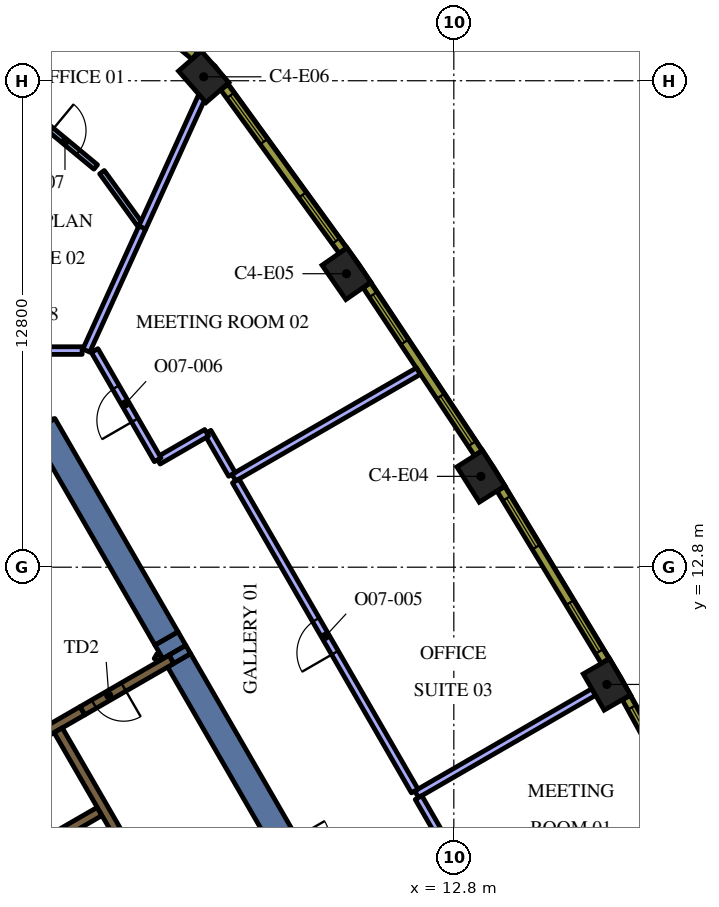
"""IFC4 building model, lengths in metres.
Left out: names, types, materials, properties, quantities, classifications, styles, units other than length and angle.
Written with IfcOpenShell. Run it as: python <this file> out.ifc"""

import sys

from ifc_helpers import new_model, si_unit, direction, frame, frame_2d, origin, origin_2d, place, context, subcontext, project, spatial, polyline, rectangle, outline, extrude, element, fill, save


model = new_model("IFC4")
c1 = context("Model", 3, precision=1e-05, world=origin(), true_north=direction((0.0, 1.0)))
c2 = subcontext(c1, "Body", "Model", "MODEL_VIEW")
j1 = project(units=[si_unit("LENGTHUNIT", "METRE"), si_unit("PLANEANGLEUNIT", "RADIAN")], contexts=[c1])
p1 = place(None, origin())
s1 = spatial("IfcSite", under=j1, at=p1, CompositionType="ELEMENT")
p2 = place(p1, origin())
s2 = spatial("IfcBuilding", under=s1, at=p2, CompositionType="ELEMENT")
p3 = place(p2, frame((0.0, 0.0, 218.4)))
s3 = spatial("IfcBuildingStorey", under=s2, at=p3, CompositionType="ELEMENT", Elevation=218.4)
for number, where, z_axis, x_axis in (
    (1, (16.827, 9.715, 0.0), (0.0, 0.0, 1.0), (-0.5, 0.866, 0.0)),
    (2, (13.513, 15.19, 0.0), (0.0, 0.0, 1.0), (-0.536, 0.845, 0.0)),
    (3, (9.975, 20.522, 0.0), (0.0, 0.0, 1.0), (-0.57, 0.822, 0.0)),
    (4, (6.219, 25.703, 0.0), (0.0, 0.0, 1.0), (-0.657, 0.754, 0.0)),
):
    element("IfcColumn", number, at=place(p3, frame(where, z_axis=z_axis, x_axis=x_axis)), inside=s3, PredefinedType="COLUMN", context=c2, shape_type="SweptSolid", body=[
        extrude(rectangle(XDim=1.1, YDim=0.8, at=origin_2d()), origin(), (0.0, 0.0, 1.0), 4.2),
    ])
p4 = place(p3, frame((5.445, 10.569, 0.0), z_axis=(0.0, 0.0, 1.0), x_axis=(-0.500218351069, 0.865899302029, 0.0)))
e5 = element("IfcWall", 5, at=p4, inside=s3, PredefinedType="SOLIDWALL", context=c2, shape_type="SweptSolid", body=[
    extrude(rectangle(XDim=0.412, YDim=0.7, at=frame_2d((0.206, 0.0))), origin(), (0.0, 0.0, 1.0), 4.2),
])
p5 = place(p3, frame((5.571, 10.35, 0.0), z_axis=(0.0, 0.0, 1.0), x_axis=(0.499968379186, -0.8660436593, 0.0)))
e6 = element("IfcWall", 6, at=p5, inside=s3, PredefinedType="SOLIDWALL", context=c2, shape_type="SweptSolid", body=[
    extrude(rectangle(XDim=5.328, YDim=0.7, at=frame_2d((2.664, 0.0))), origin(), (0.0, 0.0, 1.0), 4.2),
])
p6 = place(p3, origin())
e7 = element("IfcWall", 7, at=p6, inside=s3, PredefinedType="SOLIDWALL", context=c2, shape_type="SweptSolid", body=[
    extrude(outline(polyline([(5.432, 10.272), (5.308, 10.487), (5.749, 10.742), (5.873, 10.527), (5.432, 10.272)])), origin(), (0.0, 0.0, 1.0), 4.2),
])
p7 = place(p3, frame((5.238, 10.927, 0.0), z_axis=(0.0, 0.0, 1.0), x_axis=(-0.499985607887, 0.866033712915, 0.0)))
e8 = element("IfcWall", 8, at=p7, inside=s3, PredefinedType="SOLIDWALL", context=c2, shape_type="SweptSolid", body=[
    extrude(rectangle(XDim=6.478, YDim=0.7, at=frame_2d((3.239, 0.0))), origin(), (0.0, 0.0, 1.0), 4.2),
])
e9 = element("IfcWall", 9, at=p6, inside=s3, PredefinedType="SOLIDWALL", context=c2, shape_type="SweptSolid", body=[
    extrude(outline(polyline([(1.501, 16.7), (2.277, 16.7), (1.695, 16.364), (1.501, 16.7)])), origin(), (0.0, 0.0, 1.0), 4.2),
])
p8 = place(p3, frame((3.028, 9.023, 0.0), z_axis=(0.0, 0.0, 1.0), x_axis=(-0.866036587186, -0.49998062928, 0.0)))
e10 = element("IfcWall", 10, at=p8, inside=s3, PredefinedType="SOLIDWALL", context=c2, shape_type="SweptSolid", body=[
    extrude(rectangle(XDim=3.384, YDim=0.25, at=frame_2d((1.692, 0.0))), origin(), (0.0, 0.0, 1.0), 4.2),
])
p9 = place(p3, frame((5.97, -2.591, 0.0), z_axis=(0.0, 0.0, 1.0), x_axis=(-0.499994469932, 0.866028596547, 0.0)))
e11 = element("IfcWall", 11, at=p9, inside=s3, PredefinedType="SOLIDWALL", context=c2, shape_type="SweptSolid", body=[
    extrude(rectangle(XDim=10.488, YDim=0.25, at=frame_2d((5.244, 0.0))), origin(), (0.0, 0.0, 1.0), 4.2),
])
p10 = place(p3, frame((1.574, 5.274, 0.0), z_axis=(0.0, 0.0, 1.0), x_axis=(0.866028486751, 0.499994660107, 0.0)))
e12 = element("IfcWall", 12, at=p10, inside=s3, PredefinedType="SOLIDWALL", context=c2, shape_type="SweptSolid", body=[
    extrude(rectangle(XDim=2.2, YDim=0.25, at=frame_2d((1.1, 0.0))), origin(), (0.0, 0.0, 1.0), 4.2),
])
p11 = place(p3, frame((4.98, 10.358, 0.0), z_axis=(0.0, 0.0, 1.0), x_axis=(0.500640202437, 0.86565546709, 0.0)))
e13 = element("IfcWall", 13, at=p11, inside=s3, PredefinedType="PARTITIONING", context=c2, shape_type="SweptSolid", body=[
    extrude(rectangle(XDim=0.146, YDim=0.15, at=frame_2d((0.073, 0.0))), origin(), (0.0, 0.0, 1.0), 3.45),
])
p12 = place(p3, frame((8.565, -2.185, 0.0), z_axis=(0.0, 0.0, 1.0), x_axis=(-0.499997954832, 0.866026584559, 0.0)))
e14 = element("IfcWall", 14, at=p12, inside=s3, PredefinedType="SOLIDWALL", context=c2, shape_type="SweptSolid", body=[
    extrude(rectangle(XDim=12.35, YDim=0.25, at=frame_2d((6.175, 0.0))), origin(), (0.0, 0.0, 1.0), 4.2),
])
p13 = place(p12, frame((0.585, 0.0, 0.0)))
e15 = element("IfcOpeningElement", 15, at=p13, cuts=e14, PredefinedType="OPENING", context=c2, shape_type="SweptSolid", body=[
    extrude(rectangle(XDim=1.1, YDim=2.1, at=frame_2d((0.55, 1.05))), frame((0.0, 0.135, 0.0), z_axis=(0.0, -1.0, 0.0), x_axis=(1.0, 0.0, 0.0)), (0.0, 0.0, 1.0), 0.27),
])
p14 = place(p3, frame((5.366, 10.373, 0.0), z_axis=(0.0, 0.0, 1.0), x_axis=(-0.866019956843, -0.50000943426, 0.0)))
e16 = element("IfcWall", 16, at=p14, inside=s3, PredefinedType="SOLIDWALL", context=c2, shape_type="SweptSolid", body=[
    extrude(rectangle(XDim=2.7, YDim=0.25, at=frame_2d((1.35, 0.0))), origin(), (0.0, 0.0, 1.0), 4.2),
])
p15 = place(p14, frame((1.45, 0.0, 0.0)))
e17 = element("IfcOpeningElement", 17, at=p15, cuts=e16, PredefinedType="OPENING", context=c2, shape_type="SweptSolid", body=[
    extrude(rectangle(XDim=0.9, YDim=2.1, at=frame_2d((0.45, 1.05))), frame((0.0, 0.135, 0.0), z_axis=(0.0, -1.0, 0.0), x_axis=(1.0, 0.0, 0.0)), (0.0, 0.0, 1.0), 0.27),
])
p16 = place(p3, frame((11.821, 6.825, 0.0), z_axis=(0.0, 0.0, 1.0), x_axis=(0.866011792348, 0.500023574959, 0.0)))
e18 = element("IfcWall", 18, at=p16, inside=s3, PredefinedType="PARTITIONING", context=c2, shape_type="SweptSolid", body=[
    extrude(rectangle(XDim=5.381, YDim=0.2, at=frame_2d((2.69, 0.0))), origin(), (0.0, 0.0, 1.0), 3.45),
])
p17 = place(p3, frame((16.581, -1.419, 0.0), z_axis=(0.0, 0.0, 1.0), x_axis=(-0.500019350398, 0.866014231539, 0.0)))
e19 = element("IfcWall", 19, at=p17, inside=s3, PredefinedType="PARTITIONING", context=c2, shape_type="SweptSolid", body=[
    extrude(rectangle(XDim=9.42, YDim=0.2, at=frame_2d((4.71, 0.0))), origin(), (0.0, 0.0, 1.0), 3.45),
])
p18 = place(p17, frame((4.2, 0.0, 0.0)))
e20 = element("IfcOpeningElement", 20, at=p18, cuts=e19, PredefinedType="OPENING", context=c2, shape_type="SweptSolid", body=[
    extrude(rectangle(XDim=1.0, YDim=2.1, at=frame_2d((0.5, 1.05))), frame((0.0, 0.11, 0.0), z_axis=(0.0, -1.0, 0.0), x_axis=(1.0, 0.0, 0.0)), (0.0, 0.0, 1.0), 0.22),
])
p19 = place(p3, frame((7.011, 15.156, 0.0), z_axis=(0.0, 0.0, 1.0), x_axis=(0.866015917575, 0.500016430238, 0.0)))
e21 = element("IfcWall", 21, at=p19, inside=s3, PredefinedType="PARTITIONING", context=c2, shape_type="SweptSolid", body=[
    extrude(rectangle(XDim=5.607, YDim=0.2, at=frame_2d((2.804, 0.0))), origin(), (0.0, 0.0, 1.0), 3.45),
])
p20 = place(p3, frame((11.771, 6.912, 0.0), z_axis=(0.0, 0.0, 1.0), x_axis=(-0.500008127286, 0.866020711443, 0.0)))
e22 = element("IfcWall", 22, at=p20, inside=s3, PredefinedType="PARTITIONING", context=c2, shape_type="SweptSolid", body=[
    extrude(rectangle(XDim=9.42, YDim=0.2, at=frame_2d((4.71, 0.0))), origin(), (0.0, 0.0, 1.0), 3.45),
])
p21 = place(p20, frame((4.2, 0.0, 0.0)))
e23 = element("IfcOpeningElement", 23, at=p21, cuts=e22, PredefinedType="OPENING", context=c2, shape_type="SweptSolid", body=[
    extrude(rectangle(XDim=1.0, YDim=2.1, at=frame_2d((0.5, 1.05))), frame((0.0, 0.11, 0.0), z_axis=(0.0, -1.0, 0.0), x_axis=(1.0, 0.0, 0.0)), (0.0, 0.0, 1.0), 0.22),
])
p22 = place(p3, frame((4.599, 21.729, 0.0), z_axis=(0.0, 0.0, 1.0), x_axis=(0.414300595715, 0.91014010811, 0.0)))
e24 = element("IfcWall", 24, at=p22, inside=s3, PredefinedType="PARTITIONING", context=c2, shape_type="SweptSolid", body=[
    extrude(rectangle(XDim=3.77, YDim=0.2, at=frame_2d((1.885, 0.0))), origin(), (0.0, 0.0, 1.0), 3.45),
])
p23 = place(p3, frame((3.129, 18.5, 0.0), z_axis=(0.0, 0.0, 1.0), x_axis=(0.41435618773, 0.910114800281, 0.0)))
e25 = element("IfcWall", 25, at=p23, inside=s3, PredefinedType="PARTITIONING", context=c2, shape_type="SweptSolid", body=[
    extrude(rectangle(XDim=3.557, YDim=0.2, at=frame_2d((1.779, 0.0))), origin(), (0.0, 0.0, 1.0), 3.45),
])
p24 = place(p3, frame((6.961, 15.243, 0.0), z_axis=(0.0, 0.0, 1.0), x_axis=(-0.500036104519, 0.866004557827, 0.0)))
e26 = element("IfcWall", 26, at=p24, inside=s3, PredefinedType="PARTITIONING", context=c2, shape_type="SweptSolid", body=[
    extrude(rectangle(XDim=1.28, YDim=0.2, at=frame_2d((0.64, 0.0))), origin(), (0.0, 0.0, 1.0), 3.45),
])
p25 = place(p3, frame((6.295, 16.336, 0.0), z_axis=(0.0, 0.0, 1.0), x_axis=(-0.866088799389, -0.499890179513, 0.0)))
e27 = element("IfcWall", 27, at=p25, inside=s3, PredefinedType="PARTITIONING", context=c2, shape_type="SweptSolid", body=[
    extrude(rectangle(XDim=1.47, YDim=0.2, at=frame_2d((0.735, 0.0))), origin(), (0.0, 0.0, 1.0), 3.45),
])
p26 = place(p3, frame((5.007, 15.627, 0.0), z_axis=(0.0, 0.0, 1.0), x_axis=(-0.499962429619, 0.866047093968, 0.0)))
e28 = element("IfcWall", 28, at=p26, inside=s3, PredefinedType="PARTITIONING", context=c2, shape_type="SweptSolid", body=[
    extrude(rectangle(XDim=3.317, YDim=0.2, at=frame_2d((1.659, 0.0))), origin(), (0.0, 0.0, 1.0), 3.45),
])
p27 = place(p26, frame((1.2, 0.0, 0.0)))
e29 = element("IfcOpeningElement", 29, at=p27, cuts=e28, PredefinedType="OPENING", context=c2, shape_type="SweptSolid", body=[
    extrude(rectangle(XDim=1.0, YDim=2.1, at=frame_2d((0.5, 1.05))), frame((0.0, 0.11, 0.0), z_axis=(0.0, -1.0, 0.0), x_axis=(1.0, 0.0, 0.0)), (0.0, 0.0, 1.0), 0.22),
])
p28 = place(p3, frame((4.533, 21.826, 0.0), z_axis=(0.0, 0.0, 1.0), x_axis=(-0.587019669034, 0.809572670096, 0.0)))
e30 = element("IfcWall", 30, at=p28, inside=s3, PredefinedType="PARTITIONING", context=c2, shape_type="SweptSolid", body=[
    extrude(rectangle(XDim=1.689, YDim=0.15, at=frame_2d((0.845, 0.0))), origin(), (0.0, 0.0, 1.0), 3.45),
])
p29 = place(p3, frame((1.808, 24.631, 0.0), z_axis=(0.0, 0.0, 1.0), x_axis=(0.769986239032, -0.638060492195, 0.0)))
e31 = element("IfcWall", 31, at=p29, inside=s3, PredefinedType="PARTITIONING", context=c2, shape_type="SweptSolid", body=[
    extrude(rectangle(XDim=2.038, YDim=0.15, at=frame_2d((1.019, 0.0))), origin(), (0.0, 0.0, 1.0), 3.45),
])
p30 = place(p29, frame((0.538, 0.0, 0.0)))
e32 = element("IfcOpeningElement", 32, at=p30, cuts=e31, PredefinedType="OPENING", context=c2, shape_type="SweptSolid", body=[
    extrude(rectangle(XDim=0.9, YDim=2.1, at=frame_2d((0.45, 1.05))), frame((0.0, 0.085, 0.0), z_axis=(0.0, -1.0, 0.0), x_axis=(1.0, 0.0, 0.0)), (0.0, 0.0, 1.0), 0.17),
])
p31 = place(p3, frame((3.019, 18.5, 0.0), z_axis=(0.0, 0.0, 1.0), x_axis=(-1.0, 0.0, 0.0)))
e33 = element("IfcWall", 33, at=p31, inside=s3, PredefinedType="PARTITIONING", context=c2, shape_type="SweptSolid", body=[
    extrude(rectangle(XDim=2.919, YDim=0.2, at=frame_2d((1.459, 0.0))), origin(), (0.0, 0.0, 1.0), 3.45),
])
p32 = place(p31, frame((1.0, 0.0, 0.0)))
e34 = element("IfcOpeningElement", 34, at=p32, cuts=e33, PredefinedType="OPENING", context=c2, shape_type="SweptSolid", body=[
    extrude(rectangle(XDim=1.0, YDim=2.1, at=frame_2d((0.5, 1.05))), frame((0.0, 0.11, 0.0), z_axis=(0.0, -1.0, 0.0), x_axis=(1.0, 0.0, 0.0)), (0.0, 0.0, 1.0), 0.22),
])
p33 = place(p3, frame((19.892, 4.725, 0.0), z_axis=(0.0, 0.0, 1.0), x_axis=(-0.481925825015, 0.876212017256, 0.0)))
e35 = element("IfcWall", 35, at=p33, inside=s3, PredefinedType="SOLIDWALL", context=c2, shape_type="SweptSolid", body=[
    extrude(rectangle(XDim=5.299, YDim=0.24, at=frame_2d((2.649, 0.0))), origin(), (0.0, 0.0, 1.0), 3.95),
])
p34 = place(p33, frame((0.295, 0.0, 0.9)))
e36 = element("IfcOpeningElement", 36, at=p34, cuts=e35, PredefinedType="OPENING", context=c2, shape_type="SweptSolid", body=[
    extrude(rectangle(XDim=1.5, YDim=2.55, at=frame_2d((0.75, 1.275))), frame((0.0, 0.13, 0.0), z_axis=(0.0, -1.0, 0.0), x_axis=(1.0, 0.0, 0.0)), (0.0, 0.0, 1.0), 0.26),
])
p35 = place(p33, frame((3.504, 0.0, 0.9)))
e37 = element("IfcOpeningElement", 37, at=p35, cuts=e35, PredefinedType="OPENING", context=c2, shape_type="SweptSolid", body=[
    extrude(rectangle(XDim=1.5, YDim=2.55, at=frame_2d((0.75, 1.275))), frame((0.0, 0.13, 0.0), z_axis=(0.0, -1.0, 0.0), x_axis=(1.0, 0.0, 0.0)), (0.0, 0.0, 1.0), 0.26),
])
p36 = place(p3, frame((16.782, 10.331, 0.0), z_axis=(0.0, 0.0, 1.0), x_axis=(-0.517846166225, 0.855473756538, 0.0)))
e38 = element("IfcWall", 38, at=p36, inside=s3, PredefinedType="SOLIDWALL", context=c2, shape_type="SweptSolid", body=[
    extrude(rectangle(XDim=5.298, YDim=0.24, at=frame_2d((2.649, 0.0))), origin(), (0.0, 0.0, 1.0), 3.95),
])
p37 = place(p36, frame((0.294, 0.0, 0.9)))
e39 = element("IfcOpeningElement", 39, at=p37, cuts=e38, PredefinedType="OPENING", context=c2, shape_type="SweptSolid", body=[
    extrude(rectangle(XDim=1.5, YDim=2.55, at=frame_2d((0.75, 1.275))), frame((0.0, 0.13, 0.0), z_axis=(0.0, -1.0, 0.0), x_axis=(1.0, 0.0, 0.0)), (0.0, 0.0, 1.0), 0.26),
])
p38 = place(p36, frame((3.504, 0.0, 0.9)))
e40 = element("IfcOpeningElement", 40, at=p38, cuts=e38, PredefinedType="OPENING", context=c2, shape_type="SweptSolid", body=[
    extrude(rectangle(XDim=1.5, YDim=2.55, at=frame_2d((0.75, 1.275))), frame((0.0, 0.13, 0.0), z_axis=(0.0, -1.0, 0.0), x_axis=(1.0, 0.0, 0.0)), (0.0, 0.0, 1.0), 0.26),
])
p39 = place(p3, frame((13.442, 15.803, 0.0), z_axis=(0.0, 0.0, 1.0), x_axis=(-0.552901821755, 0.833246407433, 0.0)))
e41 = element("IfcWall", 41, at=p39, inside=s3, PredefinedType="SOLIDWALL", context=c2, shape_type="SweptSolid", body=[
    extrude(rectangle(XDim=5.298, YDim=0.24, at=frame_2d((2.649, 0.0))), origin(), (0.0, 0.0, 1.0), 3.95),
])
p40 = place(p39, frame((0.295, 0.0, 0.9)))
e42 = element("IfcOpeningElement", 42, at=p40, cuts=e41, PredefinedType="OPENING", context=c2, shape_type="SweptSolid", body=[
    extrude(rectangle(XDim=1.5, YDim=2.55, at=frame_2d((0.75, 1.275))), frame((0.0, 0.13, 0.0), z_axis=(0.0, -1.0, 0.0), x_axis=(1.0, 0.0, 0.0)), (0.0, 0.0, 1.0), 0.26),
])
p41 = place(p39, frame((3.504, 0.0, 0.9)))
e43 = element("IfcOpeningElement", 43, at=p41, cuts=e41, PredefinedType="OPENING", context=c2, shape_type="SweptSolid", body=[
    extrude(rectangle(XDim=1.5, YDim=2.55, at=frame_2d((0.75, 1.275))), frame((0.0, 0.13, 0.0), z_axis=(0.0, -1.0, 0.0), x_axis=(1.0, 0.0, 0.0)), (0.0, 0.0, 1.0), 0.26),
])
p42 = place(p3, frame((9.878, 21.132, 0.0), z_axis=(0.0, 0.0, 1.0), x_axis=(-0.586998456641, 0.80958805074, 0.0)))
e44 = element("IfcWall", 44, at=p42, inside=s3, PredefinedType="SOLIDWALL", context=c2, shape_type="SweptSolid", body=[
    extrude(rectangle(XDim=5.311, YDim=0.24, at=frame_2d((2.655, 0.0))), origin(), (0.0, 0.0, 1.0), 3.95),
])
p43 = place(p42, frame((0.306, 0.0, 0.9)))
e45 = element("IfcOpeningElement", 45, at=p43, cuts=e44, PredefinedType="OPENING", context=c2, shape_type="SweptSolid", body=[
    extrude(rectangle(XDim=1.5, YDim=2.55, at=frame_2d((0.75, 1.275))), frame((0.0, 0.13, 0.0), z_axis=(0.0, -1.0, 0.0), x_axis=(1.0, 0.0, 0.0)), (0.0, 0.0, 1.0), 0.26),
])
p44 = place(p42, frame((3.539, 0.0, 0.9)))
e46 = element("IfcOpeningElement", 46, at=p44, cuts=e44, PredefinedType="OPENING", context=c2, shape_type="SweptSolid", body=[
    extrude(rectangle(XDim=1.5, YDim=2.55, at=frame_2d((0.75, 1.275))), frame((0.0, 0.13, 0.0), z_axis=(0.0, -1.0, 0.0), x_axis=(1.0, 0.0, 0.0)), (0.0, 0.0, 1.0), 0.26),
])
p45 = place(p3, frame((5.987, 26.259, 0.0), z_axis=(0.0, 0.0, 1.0), x_axis=(-0.769990037733, 0.638055908045, 0.0)))
e47 = element("IfcWall", 47, at=p45, inside=s3, PredefinedType="SOLIDWALL", context=c2, shape_type="SweptSolid", body=[
    extrude(rectangle(XDim=2.609, YDim=0.24, at=frame_2d((1.305, 0.0))), origin(), (0.0, 0.0, 1.0), 3.95),
])
p46 = place(p45, frame((0.805, 0.0, 0.9)))
e48 = element("IfcOpeningElement", 48, at=p46, cuts=e47, PredefinedType="OPENING", context=c2, shape_type="SweptSolid", body=[
    extrude(rectangle(XDim=1.0, YDim=2.55, at=frame_2d((0.5, 1.275))), frame((0.0, 0.13, 0.0), z_axis=(0.0, -1.0, 0.0), x_axis=(1.0, 0.0, 0.0)), (0.0, 0.0, 1.0), 0.26),
])
p47 = place(p15, origin())
e49 = element("IfcDoor", 49, at=p47, inside=s3, OperationType="SINGLE_SWING_LEFT", PredefinedType="DOOR", context=c2, shape_type="SweptSolid", body=[
    extrude(rectangle(XDim=0.9, YDim=2.1, at=frame_2d((0.45, 1.05))), frame((0.0, 0.025, 0.0), z_axis=(0.0, -1.0, 0.0), x_axis=(1.0, 0.0, 0.0)), (0.0, 0.0, 1.0), 0.05),
])
fill(e17, e49)
p48 = place(p21, origin())
e50 = element("IfcDoor", 50, at=p48, inside=s3, OperationType="SINGLE_SWING_LEFT", PredefinedType="DOOR", context=c2, shape_type="SweptSolid", body=[
    extrude(rectangle(XDim=1.0, YDim=2.1, at=frame_2d((0.5, 1.05))), frame((0.0, 0.025, 0.0), z_axis=(0.0, -1.0, 0.0), x_axis=(1.0, 0.0, 0.0)), (0.0, 0.0, 1.0), 0.05),
])
fill(e23, e50)
p49 = place(p27, origin())
e51 = element("IfcDoor", 51, at=p49, inside=s3, OperationType="SINGLE_SWING_RIGHT", PredefinedType="DOOR", context=c2, shape_type="SweptSolid", body=[
    extrude(rectangle(XDim=1.0, YDim=2.1, at=frame_2d((0.5, 1.05))), frame((0.0, 0.025, 0.0), z_axis=(0.0, -1.0, 0.0), x_axis=(1.0, 0.0, 0.0)), (0.0, 0.0, 1.0), 0.05),
])
fill(e29, e51)
p50 = place(p30, origin())
e52 = element("IfcDoor", 52, at=p50, inside=s3, OperationType="SINGLE_SWING_LEFT", PredefinedType="DOOR", context=c2, shape_type="SweptSolid", body=[
    extrude(rectangle(XDim=0.9, YDim=2.1, at=frame_2d((0.45, 1.05))), frame((0.0, 0.025, 0.0), z_axis=(0.0, -1.0, 0.0), x_axis=(1.0, 0.0, 0.0)), (0.0, 0.0, 1.0), 0.05),
])
fill(e32, e52)
p51 = place(p35, origin())
e53 = element("IfcWindow", 53, at=p51, inside=s3, PartitioningType="SINGLE_PANEL", PredefinedType="WINDOW", context=c2, shape_type="SweptSolid", body=[
    extrude(rectangle(XDim=1.5, YDim=2.55, at=frame_2d((0.75, 1.275))), frame((0.0, 0.04, 0.0), z_axis=(0.0, -1.0, 0.0), x_axis=(1.0, 0.0, 0.0)), (0.0, 0.0, 1.0), 0.06),
])
fill(e37, e53)
p52 = place(p37, origin())
e54 = element("IfcWindow", 54, at=p52, inside=s3, PartitioningType="SINGLE_PANEL", PredefinedType="WINDOW", context=c2, shape_type="SweptSolid", body=[
    extrude(rectangle(XDim=1.5, YDim=2.55, at=frame_2d((0.75, 1.275))), frame((0.0, 0.04, 0.0), z_axis=(0.0, -1.0, 0.0), x_axis=(1.0, 0.0, 0.0)), (0.0, 0.0, 1.0), 0.06),
])
fill(e39, e54)
p53 = place(p38, origin())
e55 = element("IfcWindow", 55, at=p53, inside=s3, PartitioningType="SINGLE_PANEL", PredefinedType="WINDOW", context=c2, shape_type="SweptSolid", body=[
    extrude(rectangle(XDim=1.5, YDim=2.55, at=frame_2d((0.75, 1.275))), frame((0.0, 0.04, 0.0), z_axis=(0.0, -1.0, 0.0), x_axis=(1.0, 0.0, 0.0)), (0.0, 0.0, 1.0), 0.06),
])
fill(e40, e55)
p54 = place(p40, origin())
e56 = element("IfcWindow", 56, at=p54, inside=s3, PartitioningType="SINGLE_PANEL", PredefinedType="WINDOW", context=c2, shape_type="SweptSolid", body=[
    extrude(rectangle(XDim=1.5, YDim=2.55, at=frame_2d((0.75, 1.275))), frame((0.0, 0.04, 0.0), z_axis=(0.0, -1.0, 0.0), x_axis=(1.0, 0.0, 0.0)), (0.0, 0.0, 1.0), 0.06),
])
fill(e42, e56)
p55 = place(p41, origin())
e57 = element("IfcWindow", 57, at=p55, inside=s3, PartitioningType="SINGLE_PANEL", PredefinedType="WINDOW", context=c2, shape_type="SweptSolid", body=[
    extrude(rectangle(XDim=1.5, YDim=2.55, at=frame_2d((0.75, 1.275))), frame((0.0, 0.04, 0.0), z_axis=(0.0, -1.0, 0.0), x_axis=(1.0, 0.0, 0.0)), (0.0, 0.0, 1.0), 0.06),
])
fill(e43, e57)
p56 = place(p43, origin())
e58 = element("IfcWindow", 58, at=p56, inside=s3, PartitioningType="SINGLE_PANEL", PredefinedType="WINDOW", context=c2, shape_type="SweptSolid", body=[
    extrude(rectangle(XDim=1.5, YDim=2.55, at=frame_2d((0.75, 1.275))), frame((0.0, 0.04, 0.0), z_axis=(0.0, -1.0, 0.0), x_axis=(1.0, 0.0, 0.0)), (0.0, 0.0, 1.0), 0.06),
])
fill(e45, e58)
p57 = place(p44, origin())
e59 = element("IfcWindow", 59, at=p57, inside=s3, PartitioningType="SINGLE_PANEL", PredefinedType="WINDOW", context=c2, shape_type="SweptSolid", body=[
    extrude(rectangle(XDim=1.5, YDim=2.55, at=frame_2d((0.75, 1.275))), frame((0.0, 0.04, 0.0), z_axis=(0.0, -1.0, 0.0), x_axis=(1.0, 0.0, 0.0)), (0.0, 0.0, 1.0), 0.06),
])
fill(e46, e59)
save(model, sys.argv[1])
